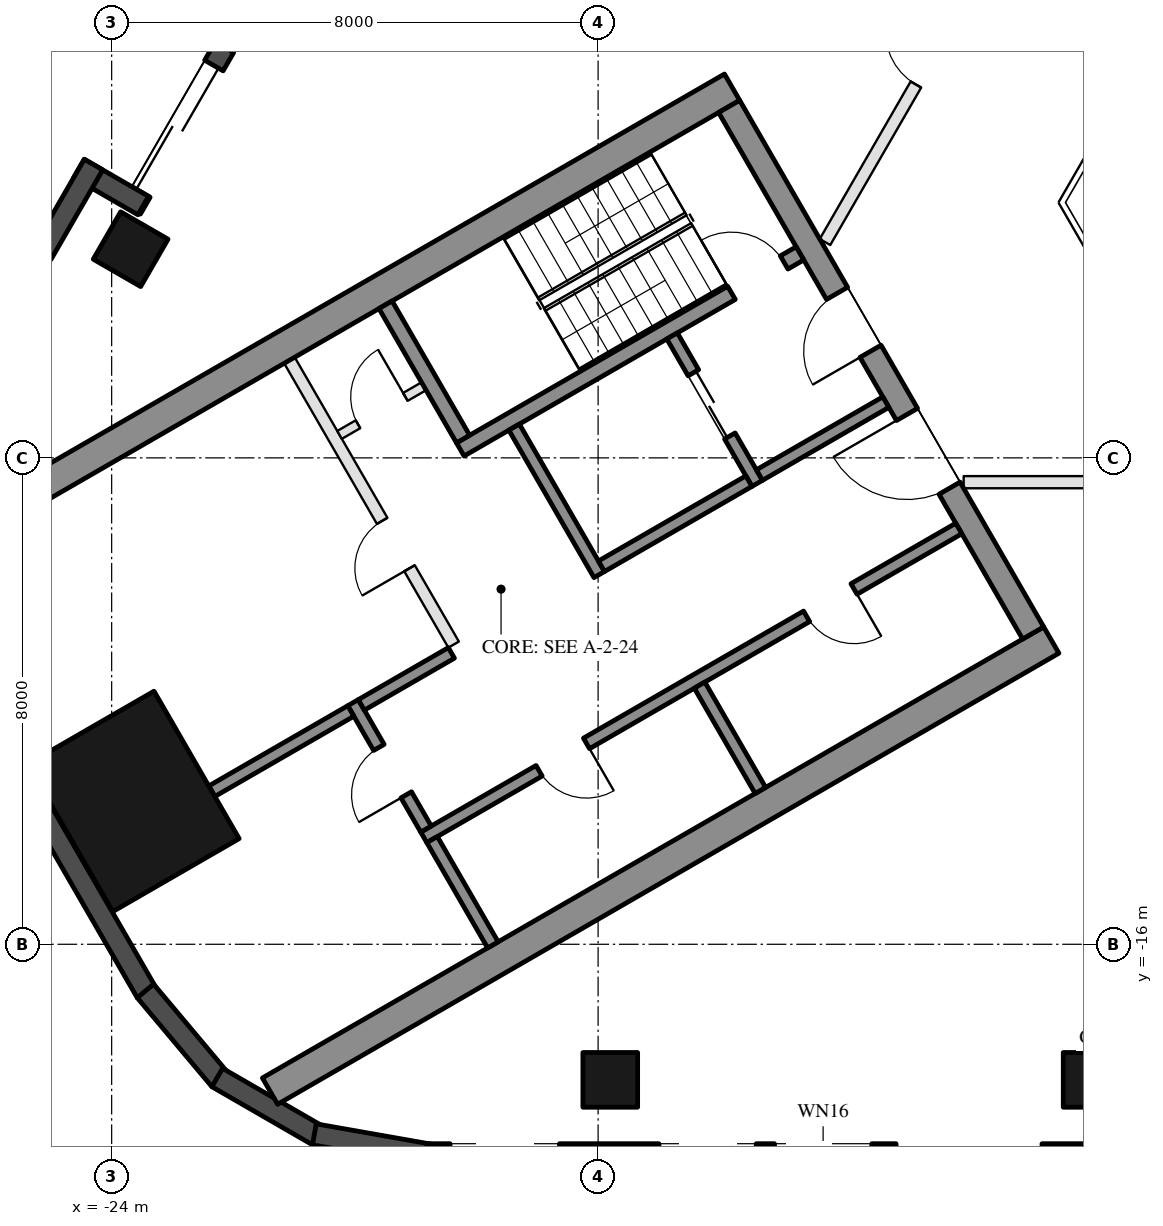
"""IFC4 building model, lengths in metres.
Left out: names, types, materials, properties, quantities, classifications, styles, units other than length and angle.
Written with IfcOpenShell. Run it as: python <this file> out.ifc"""

import sys

from ifc_helpers import new_model, si_unit, direction, frame, frame_2d, origin, origin_2d, place, context, subcontext, project, spatial, rectangle, hollow_rectangle, extrude, element, fill, save


model = new_model("IFC4")
c1 = context("Model", 3, precision=1e-05, world=origin(), true_north=direction((0.0, 1.0)))
c2 = subcontext(c1, "Body", "Model", "MODEL_VIEW")
j1 = project(units=[si_unit("LENGTHUNIT", "METRE"), si_unit("PLANEANGLEUNIT", "RADIAN")], contexts=[c1])
p1 = place(None, origin())
s1 = spatial("IfcSite", under=j1, at=p1, CompositionType="ELEMENT")
p2 = place(p1, origin())
s2 = spatial("IfcBuilding", under=s1, at=p2, CompositionType="ELEMENT")
p3 = place(p2, frame((0.0, 0.0, 109.4)))
s3 = spatial("IfcBuildingStorey", under=s2, at=p3, CompositionType="ELEMENT", Elevation=109.4)
for number, where, z_axis, x_axis in (
    (1, (-15.8, -18.23, 0.0), (0.0, 0.0, 1.0), (-1.0, 0.0, 0.0)),
    (2, (-7.9, -18.23, 0.0), (0.0, 0.0, 1.0), (-1.0, 0.0, 0.0)),
    (3, (-23.688, -4.568, 0.0), (0.0, 0.0, 1.0), (0.5, 0.866, 0.0)),
):
    element("IfcColumn", number, at=place(p3, frame(where, z_axis=z_axis, x_axis=x_axis)), inside=s3, PredefinedType="COLUMN", context=c2, shape_type="SweptSolid", body=[
        extrude(hollow_rectangle(XDim=0.9, YDim=0.9, WallThickness=0.04, at=origin_2d()), origin(), (0.0, 0.0, 1.0), 3.7),
    ])
p4 = place(p3, frame((-23.643, -13.65, 0.0), z_axis=(0.0, 0.0, 1.0), x_axis=(-0.5, 0.866025403784, 0.0)))
e4 = element("IfcColumn", 4, at=p4, inside=s3, PredefinedType="COLUMN", context=c2, shape_type="SweptSolid", body=[
    extrude(hollow_rectangle(XDim=2.8, YDim=2.4, WallThickness=0.07, at=origin_2d()), origin(), (0.0, 0.0, 1.0), 3.7),
])
p5 = place(p3, frame((-20.309, 1.934, 0.0), z_axis=(0.0, 0.0, 1.0), x_axis=(-0.499992114976, -0.866029956157, 0.0)))
e5 = element("IfcWall", 5, at=p5, inside=s3, PredefinedType="SOLIDWALL", context=c2, shape_type="SweptSolid", body=[
    extrude(rectangle(XDim=6.74, YDim=0.35, at=frame_2d((3.37, 0.0))), origin(), (0.0, 0.0, 1.0), 3.55),
])
p6 = place(p5, frame((4.02, 0.0, 0.0)))
e6 = element("IfcOpeningElement", 6, at=p6, cuts=e5, PredefinedType="OPENING", context=c2, shape_type="SweptSolid", body=[
    extrude(rectangle(XDim=2.4, YDim=2.4, at=frame_2d((1.2, 1.2))), frame((0.0, 0.185, 0.0), z_axis=(0.0, -1.0, 0.0), x_axis=(1.0, 0.0, 0.0)), (0.0, 0.0, 1.0), 0.37),
])
p7 = place(p5, frame((0.77, 0.0, 0.3)))
e7 = element("IfcOpeningElement", 7, at=p7, cuts=e5, PredefinedType="OPENING", context=c2, shape_type="SweptSolid", body=[
    extrude(rectangle(XDim=2.9, YDim=2.65, at=frame_2d((1.45, 1.325))), frame((0.0, 0.185, 0.0), z_axis=(0.0, -1.0, 0.0), x_axis=(1.0, 0.0, 0.0)), (0.0, 0.0, 1.0), 0.37),
])
p8 = place(p3, frame((-23.481, -3.85, 0.0), z_axis=(0.0, 0.0, 1.0), x_axis=(-0.866092288191, 0.499884134912, 0.0)))
e8 = element("IfcWall", 8, at=p8, inside=s3, PredefinedType="SOLIDWALL", context=c2, shape_type="SweptSolid", body=[
    extrude(rectangle(XDim=1.22, YDim=0.35, at=frame_2d((0.61, 0.0))), origin(), (0.0, 0.0, 1.0), 3.55),
])
p9 = place(p3, frame((-24.299, -3.176, 0.0), z_axis=(0.0, 0.0, 1.0), x_axis=(-0.500028278809, -0.866009076391, 0.0)))
e9 = element("IfcWall", 9, at=p9, inside=s3, PredefinedType="SOLIDWALL", context=c2, shape_type="SweptSolid", body=[
    extrude(rectangle(XDim=3.916, YDim=0.35, at=frame_2d((1.958, 0.0))), origin(), (0.0, 0.0, 1.0), 3.55),
])
p10 = place(p9, frame((1.7, 0.0, 0.3)))
e10 = element("IfcOpeningElement", 10, at=p10, cuts=e9, PredefinedType="OPENING", context=c2, shape_type="SweptSolid", body=[
    extrude(rectangle(XDim=1.8, YDim=2.65, at=frame_2d((0.9, 1.325))), frame((0.0, 0.185, 0.0), z_axis=(0.0, -1.0, 0.0), x_axis=(1.0, 0.0, 0.0)), (0.0, 0.0, 1.0), 0.37),
])
p11 = place(p3, frame((-26.257, -11.893, 0.0), z_axis=(0.0, 0.0, 1.0), x_axis=(0.500018773155, -0.866014564827, 0.0)))
e11 = element("IfcWall", 11, at=p11, inside=s3, PredefinedType="SOLIDWALL", context=c2, shape_type="SweptSolid", body=[
    extrude(rectangle(XDim=5.658, YDim=0.35, at=frame_2d((2.829, 0.0))), origin(), (0.0, 0.0, 1.0), 3.55),
])
for number, where, z_axis, x_axis in (
    (12, (-23.445, -16.768, 0.0), (0.0, 0.0, 1.0), (0.643, -0.766, 0.0)),
    (13, (-22.264, -18.192, 0.0), (0.0, 0.0, 1.0), (0.866, -0.5, 0.0)),
):
    element("IfcWall", number, at=place(p3, frame(where, z_axis=z_axis, x_axis=x_axis)), inside=s3, PredefinedType="SOLIDWALL", context=c2, shape_type="SweptSolid", body=[
        extrude(rectangle(XDim=1.91, YDim=0.35, at=frame_2d((0.955, 0.0))), origin(), (0.0, 0.0, 1.0), 3.55),
    ])
p12 = place(p3, frame((-20.667, -19.126, 0.0), z_axis=(0.0, 0.0, 1.0), x_axis=(0.984798995425, -0.173697837091, 0.0)))
e14 = element("IfcWall", 14, at=p12, inside=s3, PredefinedType="SOLIDWALL", context=c2, shape_type="SweptSolid", body=[
    extrude(rectangle(XDim=1.91, YDim=0.35, at=frame_2d((0.955, 0.0))), origin(), (0.0, 0.0, 1.0), 3.55),
])
p13 = place(p3, frame((-18.816, -19.455, 0.0), z_axis=(0.0, 0.0, 1.0), x_axis=(1.0, 0.0, 0.0)))
e15 = element("IfcWall", 15, at=p13, inside=s3, PredefinedType="SOLIDWALL", context=c2, shape_type="SweptSolid", body=[
    extrude(rectangle(XDim=11.816, YDim=0.35, at=frame_2d((5.908, 0.0))), origin(), (0.0, 0.0, 1.0), 3.55),
])
p14 = place(p13, frame((0.381, 0.0, 0.3)))
e16 = element("IfcOpeningElement", 16, at=p14, cuts=e15, PredefinedType="OPENING", context=c2, shape_type="SweptSolid", body=[
    extrude(rectangle(XDim=1.8, YDim=2.65, at=frame_2d((0.9, 1.325))), frame((0.0, 0.185, 0.0), z_axis=(0.0, -1.0, 0.0), x_axis=(1.0, 0.0, 0.0)), (0.0, 0.0, 1.0), 0.37),
])
p15 = place(p13, frame((7.716, 0.0, 0.0)))
e17 = element("IfcOpeningElement", 17, at=p15, cuts=e15, PredefinedType="OPENING", context=c2, shape_type="SweptSolid", body=[
    extrude(rectangle(XDim=2.4, YDim=2.4, at=frame_2d((1.2, 1.2))), frame((0.0, 0.185, 0.0), z_axis=(0.0, -1.0, 0.0), x_axis=(1.0, 0.0, 0.0)), (0.0, 0.0, 1.0), 0.37),
])
p16 = place(p13, frame((3.816, 0.0, 0.3)))
e18 = element("IfcOpeningElement", 18, at=p16, cuts=e15, PredefinedType="OPENING", context=c2, shape_type="SweptSolid", body=[
    extrude(rectangle(XDim=1.6, YDim=2.65, at=frame_2d((0.8, 1.325))), frame((0.0, 0.185, 0.0), z_axis=(0.0, -1.0, 0.0), x_axis=(1.0, 0.0, 0.0)), (0.0, 0.0, 1.0), 0.37),
])
p17 = place(p13, frame((5.716, 0.0, 0.3)))
e19 = element("IfcOpeningElement", 19, at=p17, cuts=e15, PredefinedType="OPENING", context=c2, shape_type="SweptSolid", body=[
    extrude(rectangle(XDim=1.6, YDim=2.65, at=frame_2d((0.8, 1.325))), frame((0.0, 0.185, 0.0), z_axis=(0.0, -1.0, 0.0), x_axis=(1.0, 0.0, 0.0)), (0.0, 0.0, 1.0), 0.37),
])
for number, where, z_axis, x_axis in (
    (20, (-13.797, -1.903, 0.0), (0.0, 0.0, 1.0), (-0.866, -0.5, 0.0)),
    (21, (-8.547, -10.997, 0.0), (0.0, 0.0, 1.0), (-0.866, -0.5, 0.0)),
):
    element("IfcWall", number, at=place(p3, frame(where, z_axis=z_axis, x_axis=x_axis)), inside=s3, PredefinedType="SHEAR", context=c2, shape_type="SweptSolid", body=[
        extrude(rectangle(XDim=14.837, YDim=0.5, at=frame_2d((7.418, 0.0))), origin(), (0.0, 0.0, 1.0), 3.5),
    ])
p18 = place(p3, frame((-13.845, -2.22, 0.0), z_axis=(0.0, 0.0, 1.0), x_axis=(0.500004234368, -0.866022959057, 0.0)))
e22 = element("IfcWall", 22, at=p18, inside=s3, PredefinedType="SHEAR", context=c2, shape_type="SweptSolid", body=[
    extrude(rectangle(XDim=10.0, YDim=0.4, at=frame_2d((5.0, 0.0))), origin(), (0.0, 0.0, 1.0), 3.5),
])
p19 = place(p18, frame((3.55, 0.0, 0.0)))
e23 = element("IfcOpeningElement", 23, at=p19, cuts=e22, PredefinedType="OPENING", context=c2, shape_type="SweptSolid", body=[
    extrude(rectangle(XDim=1.1, YDim=2.1, at=frame_2d((0.55, 1.05))), frame((0.0, 0.21, 0.0), z_axis=(0.0, -1.0, 0.0), x_axis=(1.0, 0.0, 0.0)), (0.0, 0.0, 1.0), 0.42),
])
p20 = place(p18, frame((5.85, 0.0, 0.0)))
e24 = element("IfcOpeningElement", 24, at=p20, cuts=e22, PredefinedType="OPENING", context=c2, shape_type="SweptSolid", body=[
    extrude(rectangle(XDim=1.4, YDim=2.1, at=frame_2d((0.7, 1.05))), frame((0.0, 0.21, 0.0), z_axis=(0.0, -1.0, 0.0), x_axis=(1.0, 0.0, 0.0)), (0.0, 0.0, 1.0), 0.42),
])
p21 = place(p3, frame((-12.681, -4.636, 0.0), z_axis=(0.0, 0.0, 1.0), x_axis=(-0.866021702275, -0.500006411147, 0.0)))
e25 = element("IfcWall", 25, at=p21, inside=s3, PredefinedType="SHEAR", context=c2, shape_type="SweptSolid", body=[
    extrude(rectangle(XDim=6.45, YDim=0.25, at=frame_2d((3.225, 0.0))), origin(), (0.0, 0.0, 1.0), 3.5),
])
p22 = place(p21, frame((0.3, 0.0, 0.0)))
e26 = element("IfcOpeningElement", 26, at=p22, cuts=e25, PredefinedType="OPENING", context=c2, shape_type="SweptSolid", body=[
    extrude(rectangle(XDim=1.0, YDim=2.1, at=frame_2d((0.5, 1.05))), frame((0.0, 0.135, 0.0), z_axis=(0.0, -1.0, 0.0), x_axis=(1.0, 0.0, 0.0)), (0.0, 0.0, 1.0), 0.27),
])
p23 = place(p3, frame((-19.496, -5.482, 0.0), z_axis=(0.0, 0.0, 1.0), x_axis=(0.499990435942, -0.866030925526, 0.0)))
e27 = element("IfcWall", 27, at=p23, inside=s3, PredefinedType="SHEAR", context=c2, shape_type="SweptSolid", body=[
    extrude(rectangle(XDim=2.55, YDim=0.25, at=frame_2d((1.275, 0.0))), origin(), (0.0, 0.0, 1.0), 3.5),
])
p24 = place(p3, frame((-17.381, -7.495, 0.0), z_axis=(0.0, 0.0, 1.0), x_axis=(0.500011755427, -0.866018616679, 0.0)))
e28 = element("IfcWall", 28, at=p24, inside=s3, PredefinedType="SHEAR", context=c2, shape_type="SweptSolid", body=[
    extrude(rectangle(XDim=2.8, YDim=0.2, at=frame_2d((1.4, 0.0))), origin(), (0.0, 0.0, 1.0), 3.5),
])
p25 = place(p3, frame((-14.783, -5.995, 0.0), z_axis=(0.0, 0.0, 1.0), x_axis=(0.49994636267, -0.866056369097, 0.0)))
e29 = element("IfcWall", 29, at=p25, inside=s3, PredefinedType="SHEAR", context=c2, shape_type="SweptSolid", body=[
    extrude(rectangle(XDim=2.8, YDim=0.2, at=frame_2d((1.4, 0.0))), origin(), (0.0, 0.0, 1.0), 3.5),
])
p26 = place(p25, frame((0.7, 0.0, 0.0)))
e30 = element("IfcOpeningElement", 30, at=p26, cuts=e29, PredefinedType="OPENING", context=c2, shape_type="SweptSolid", body=[
    extrude(rectangle(XDim=1.2, YDim=2.1, at=frame_2d((0.6, 1.05))), frame((0.0, 0.11, 0.0), z_axis=(0.0, -1.0, 0.0), x_axis=(1.0, 0.0, 0.0)), (0.0, 0.0, 1.0), 0.22),
])
p27 = place(p3, frame((-13.52, -8.383, 0.0), z_axis=(0.0, 0.0, 1.0), x_axis=(-0.866034573852, -0.49998411664, 0.0)))
e31 = element("IfcWall", 31, at=p27, inside=s3, PredefinedType="SHEAR", context=c2, shape_type="SweptSolid", body=[
    extrude(rectangle(XDim=2.8, YDim=0.2, at=frame_2d((1.4, 0.0))), origin(), (0.0, 0.0, 1.0), 3.5),
])
p28 = place(p3, frame((-11.268, -7.083, 0.0), z_axis=(0.0, 0.0, 1.0), x_axis=(-0.866050077142, -0.499957262057, 0.0)))
e32 = element("IfcWall", 32, at=p28, inside=s3, PredefinedType="SHEAR", context=c2, shape_type="SweptSolid", body=[
    extrude(rectangle(XDim=2.4, YDim=0.2, at=frame_2d((1.2, 0.0))), origin(), (0.0, 0.0, 1.0), 3.5),
])
p29 = place(p3, frame((-10.068, -9.162, 0.0), z_axis=(0.0, 0.0, 1.0), x_axis=(-0.866032725843, -0.499987317609, 0.0)))
e33 = element("IfcWall", 33, at=p29, inside=s3, PredefinedType="SHEAR", context=c2, shape_type="SweptSolid", body=[
    extrude(rectangle(XDim=10.16, YDim=0.2, at=frame_2d((5.08, 0.0))), origin(), (0.0, 0.0, 1.0), 3.5),
])
p30 = place(p29, frame((1.99, 0.0, 0.0)))
e34 = element("IfcOpeningElement", 34, at=p30, cuts=e33, PredefinedType="OPENING", context=c2, shape_type="SweptSolid", body=[
    extrude(rectangle(XDim=0.9, YDim=2.1, at=frame_2d((0.45, 1.05))), frame((0.0, 0.11, 0.0), z_axis=(0.0, -1.0, 0.0), x_axis=(1.0, 0.0, 0.0)), (0.0, 0.0, 1.0), 0.22),
])
p31 = place(p29, frame((7.07, 0.0, 0.0)))
e35 = element("IfcOpeningElement", 35, at=p31, cuts=e33, PredefinedType="OPENING", context=c2, shape_type="SweptSolid", body=[
    extrude(rectangle(XDim=0.9, YDim=2.1, at=frame_2d((0.45, 1.05))), frame((0.0, 0.11, 0.0), z_axis=(0.0, -1.0, 0.0), x_axis=(1.0, 0.0, 0.0)), (0.0, 0.0, 1.0), 0.22),
])
p32 = place(p3, frame((-20.031, -12.026, 0.0), z_axis=(0.0, 0.0, 1.0), x_axis=(0.500033551112, -0.866006032174, 0.0)))
e36 = element("IfcWall", 36, at=p32, inside=s3, PredefinedType="SHEAR", context=c2, shape_type="SweptSolid", body=[
    extrude(rectangle(XDim=2.4, YDim=0.2, at=frame_2d((1.2, 0.0))), origin(), (0.0, 0.0, 1.0), 3.5),
])
p33 = place(p32, frame((0.85, 0.0, 0.0)))
e37 = element("IfcOpeningElement", 37, at=p33, cuts=e36, PredefinedType="OPENING", context=c2, shape_type="SweptSolid", body=[
    extrude(rectangle(XDim=0.9, YDim=2.1, at=frame_2d((0.45, 1.05))), frame((0.0, 0.11, 0.0), z_axis=(0.0, -1.0, 0.0), x_axis=(1.0, 0.0, 0.0)), (0.0, 0.0, 1.0), 0.22),
])
p34 = place(p3, frame((-18.413, -11.208, 0.0), z_axis=(0.0, 0.0, 1.0), x_axis=(-0.866038183914, -0.499977863513, 0.0)))
e38 = element("IfcWall", 38, at=p34, inside=s3, PredefinedType="SHEAR", context=c2, shape_type="SweptSolid", body=[
    extrude(rectangle(XDim=1.71, YDim=0.2, at=frame_2d((0.855, 0.0))), origin(), (0.0, 0.0, 1.0), 3.5),
])
for number, where, z_axis, x_axis in (
    (39, (-14.331, -11.738, 0.0), (0.0, 0.0, 1.0), (0.5, -0.866, 0.0)),
    (40, (-18.73, -14.278, 0.0), (0.0, 0.0, 1.0), (0.5, -0.866, 0.0)),
):
    element("IfcWall", number, at=place(p3, frame(where, z_axis=z_axis, x_axis=x_axis)), inside=s3, PredefinedType="SHEAR", context=c2, shape_type="SweptSolid", body=[
        extrude(rectangle(XDim=2.0, YDim=0.2, at=frame_2d((1.0, 0.0))), origin(), (0.0, 0.0, 1.0), 3.5),
    ])
p35 = place(p3, frame((-20.067, -12.163, 0.0), z_axis=(0.0, 0.0, 1.0), x_axis=(-0.866060851709, -0.499938597367, 0.0)))
e41 = element("IfcWall", 41, at=p35, inside=s3, PredefinedType="SHEAR", context=c2, shape_type="SweptSolid", body=[
    extrude(rectangle(XDim=2.64, YDim=0.2, at=frame_2d((1.32, 0.0))), origin(), (0.0, 0.0, 1.0), 3.5),
])
p36 = place(p3, frame((-21.076, -6.395, 0.0), z_axis=(0.0, 0.0, 1.0), x_axis=(0.50001468107, -0.866016927499, 0.0)))
e42 = element("IfcWall", 42, at=p36, inside=s3, PredefinedType="PARTITIONING", context=c2, shape_type="SweptSolid", body=[
    extrude(rectangle(XDim=5.4, YDim=0.2, at=frame_2d((2.7, 0.0))), origin(), (0.0, 0.0, 1.0), 3.5),
])
p37 = place(p36, frame((3.05, 0.0, 0.0)))
e43 = element("IfcOpeningElement", 43, at=p37, cuts=e42, PredefinedType="OPENING", context=c2, shape_type="SweptSolid", body=[
    extrude(rectangle(XDim=0.9, YDim=2.1, at=frame_2d((0.45, 1.05))), frame((0.0, 0.11, 0.0), z_axis=(0.0, -1.0, 0.0), x_axis=(1.0, 0.0, 0.0)), (0.0, 0.0, 1.0), 0.22),
])
p38 = place(p3, frame((-18.866, -6.822, 0.0), z_axis=(0.0, 0.0, 1.0), x_axis=(-0.866028054938, -0.499995408039, 0.0)))
e44 = element("IfcWall", 44, at=p38, inside=s3, PredefinedType="PARTITIONING", context=c2, shape_type="SweptSolid", body=[
    extrude(rectangle(XDim=1.6, YDim=0.15, at=frame_2d((0.8, 0.0))), origin(), (0.0, 0.0, 1.0), 3.5),
])
p39 = place(p38, frame((0.35, 0.0, 0.0)))
e45 = element("IfcOpeningElement", 45, at=p39, cuts=e44, PredefinedType="OPENING", context=c2, shape_type="SweptSolid", body=[
    extrude(rectangle(XDim=0.9, YDim=2.1, at=frame_2d((0.45, 1.05))), frame((0.0, 0.085, 0.0), z_axis=(0.0, -1.0, 0.0), x_axis=(1.0, 0.0, 0.0)), (0.0, 0.0, 1.0), 0.17),
])
p40 = place(p3, frame((-0.807, -8.4, 0.0), z_axis=(0.0, 0.0, 1.0), x_axis=(-1.0, 0.0, 0.0)))
e46 = element("IfcWall", 46, at=p40, inside=s3, PredefinedType="PARTITIONING", context=c2, shape_type="SweptSolid", body=[
    extrude(rectangle(XDim=9.182, YDim=0.2, at=frame_2d((4.591, 0.0))), origin(), (0.0, 0.0, 1.0), 2.95),
])
p41 = place(p40, frame((4.091, 0.0, 0.0)))
e47 = element("IfcOpeningElement", 47, at=p41, cuts=e46, PredefinedType="OPENING", context=c2, shape_type="SweptSolid", body=[
    extrude(rectangle(XDim=1.0, YDim=2.1, at=frame_2d((0.5, 1.05))), frame((0.0, 0.11, 0.0), z_axis=(0.0, -1.0, 0.0), x_axis=(1.0, 0.0, 0.0)), (0.0, 0.0, 1.0), 0.22),
])
p42 = place(p3, frame((-12.269, -4.45, 0.0), z_axis=(0.0, 0.0, 1.0), x_axis=(0.500016026819, 0.866016150498, 0.0)))
e48 = element("IfcWall", 48, at=p42, inside=s3, PredefinedType="PARTITIONING", context=c2, shape_type="SweptSolid", body=[
    extrude(rectangle(XDim=6.983, YDim=0.2, at=frame_2d((3.491, 0.0))), origin(), (0.0, 0.0, 1.0), 2.95),
])
p43 = place(p42, frame((2.991, 0.0, 0.0)))
e49 = element("IfcOpeningElement", 49, at=p43, cuts=e48, PredefinedType="OPENING", context=c2, shape_type="SweptSolid", body=[
    extrude(rectangle(XDim=1.0, YDim=2.1, at=frame_2d((0.5, 1.05))), frame((0.0, 0.11, 0.0), z_axis=(0.0, -1.0, 0.0), x_axis=(1.0, 0.0, 0.0)), (0.0, 0.0, 1.0), 0.22),
])
p44 = place(p6, frame((2.4, 0.0, 0.0), z_axis=(0.0, 0.0, 1.0), x_axis=(-1.0, 0.0, 0.0)))
e50 = element("IfcDoor", 50, at=p44, inside=s3, OperationType="SLIDING_TO_LEFT", PredefinedType="DOOR", context=c2, shape_type="SweptSolid", body=[
    extrude(rectangle(XDim=2.4, YDim=2.4, at=frame_2d((1.2, 1.2))), frame((0.0, 0.025, 0.0), z_axis=(0.0, -1.0, 0.0), x_axis=(1.0, 0.0, 0.0)), (0.0, 0.0, 1.0), 0.05),
])
fill(e6, e50)
p45 = place(p26, origin())
e51 = element("IfcDoor", 51, at=p45, inside=s3, OperationType="DOUBLE_DOOR_SLIDING", PredefinedType="DOOR", context=c2, shape_type="SweptSolid", body=[
    extrude(rectangle(XDim=1.2, YDim=2.1, at=frame_2d((0.6, 1.05))), frame((0.0, 0.025, 0.0), z_axis=(0.0, -1.0, 0.0), x_axis=(1.0, 0.0, 0.0)), (0.0, 0.0, 1.0), 0.05),
])
fill(e30, e51)
p46 = place(p39, frame((0.9, 0.0, 0.0), z_axis=(0.0, 0.0, 1.0), x_axis=(-1.0, 0.0, 0.0)))
e52 = element("IfcDoor", 52, at=p46, inside=s3, OperationType="SINGLE_SWING_RIGHT", PredefinedType="DOOR", context=c2, shape_type="SweptSolid", body=[
    extrude(rectangle(XDim=0.9, YDim=2.1, at=frame_2d((0.45, 1.05))), frame((0.0, 0.025, 0.0), z_axis=(0.0, -1.0, 0.0), x_axis=(1.0, 0.0, 0.0)), (0.0, 0.0, 1.0), 0.05),
])
fill(e45, e52)
p47 = place(p30, origin())
e53 = element("IfcDoor", 53, at=p47, inside=s3, OperationType="SINGLE_SWING_LEFT", PredefinedType="DOOR", context=c2, shape_type="SweptSolid", body=[
    extrude(rectangle(XDim=0.9, YDim=2.1, at=frame_2d((0.45, 1.05))), frame((0.0, 0.025, 0.0), z_axis=(0.0, -1.0, 0.0), x_axis=(1.0, 0.0, 0.0)), (0.0, 0.0, 1.0), 0.05),
])
fill(e34, e53)
p48 = place(p31, origin())
e54 = element("IfcDoor", 54, at=p48, inside=s3, OperationType="SINGLE_SWING_LEFT", PredefinedType="DOOR", context=c2, shape_type="SweptSolid", body=[
    extrude(rectangle(XDim=0.9, YDim=2.1, at=frame_2d((0.45, 1.05))), frame((0.0, 0.025, 0.0), z_axis=(0.0, -1.0, 0.0), x_axis=(1.0, 0.0, 0.0)), (0.0, 0.0, 1.0), 0.05),
])
fill(e35, e54)
p49 = place(p33, frame((0.9, 0.0, 0.0), z_axis=(0.0, 0.0, 1.0), x_axis=(-1.0, 0.0, 0.0)))
e55 = element("IfcDoor", 55, at=p49, inside=s3, OperationType="SINGLE_SWING_LEFT", PredefinedType="DOOR", context=c2, shape_type="SweptSolid", body=[
    extrude(rectangle(XDim=0.9, YDim=2.1, at=frame_2d((0.45, 1.05))), frame((0.0, 0.025, 0.0), z_axis=(0.0, -1.0, 0.0), x_axis=(1.0, 0.0, 0.0)), (0.0, 0.0, 1.0), 0.05),
])
fill(e37, e55)
p50 = place(p37, frame((0.9, 0.0, 0.0), z_axis=(0.0, 0.0, 1.0), x_axis=(-1.0, 0.0, 0.0)))
e56 = element("IfcDoor", 56, at=p50, inside=s3, OperationType="SINGLE_SWING_LEFT", PredefinedType="DOOR", context=c2, shape_type="SweptSolid", body=[
    extrude(rectangle(XDim=0.9, YDim=2.1, at=frame_2d((0.45, 1.05))), frame((0.0, 0.025, 0.0), z_axis=(0.0, -1.0, 0.0), x_axis=(1.0, 0.0, 0.0)), (0.0, 0.0, 1.0), 0.05),
])
fill(e43, e56)
p51 = place(p19, frame((1.1, 0.0, 0.0), z_axis=(0.0, 0.0, 1.0), x_axis=(-1.0, 0.0, 0.0)))
e57 = element("IfcDoor", 57, at=p51, inside=s3, OperationType="SINGLE_SWING_LEFT", PredefinedType="DOOR", context=c2, shape_type="SweptSolid", body=[
    extrude(rectangle(XDim=1.1, YDim=2.1, at=frame_2d((0.55, 1.05))), frame((0.0, 0.025, 0.0), z_axis=(0.0, -1.0, 0.0), x_axis=(1.0, 0.0, 0.0)), (0.0, 0.0, 1.0), 0.05),
])
fill(e23, e57)
p52 = place(p20, frame((1.4, 0.0, 0.0), z_axis=(0.0, 0.0, 1.0), x_axis=(-1.0, 0.0, 0.0)))
e58 = element("IfcDoor", 58, at=p52, inside=s3, OperationType="DOUBLE_DOOR_SINGLE_SWING", PredefinedType="DOOR", context=c2, shape_type="SweptSolid", body=[
    extrude(rectangle(XDim=1.4, YDim=2.1, at=frame_2d((0.7, 1.05))), frame((0.0, 0.025, 0.0), z_axis=(0.0, -1.0, 0.0), x_axis=(1.0, 0.0, 0.0)), (0.0, 0.0, 1.0), 0.05),
])
fill(e24, e58)
p53 = place(p22, frame((1.0, 0.0, 0.0), z_axis=(0.0, 0.0, 1.0), x_axis=(-1.0, 0.0, 0.0)))
e59 = element("IfcDoor", 59, at=p53, inside=s3, OperationType="SINGLE_SWING_LEFT", PredefinedType="DOOR", context=c2, shape_type="SweptSolid", body=[
    extrude(rectangle(XDim=1.0, YDim=2.1, at=frame_2d((0.5, 1.05))), frame((0.0, 0.025, 0.0), z_axis=(0.0, -1.0, 0.0), x_axis=(1.0, 0.0, 0.0)), (0.0, 0.0, 1.0), 0.05),
])
fill(e26, e59)
p54 = place(p43, origin())
e60 = element("IfcDoor", 60, at=p54, inside=s3, OperationType="SINGLE_SWING_RIGHT", PredefinedType="DOOR", context=c2, shape_type="SweptSolid", body=[
    extrude(rectangle(XDim=1.0, YDim=2.1, at=frame_2d((0.5, 1.05))), frame((0.0, 0.025, 0.0), z_axis=(0.0, -1.0, 0.0), x_axis=(1.0, 0.0, 0.0)), (0.0, 0.0, 1.0), 0.05),
])
fill(e49, e60)
save(model, sys.argv[1])
